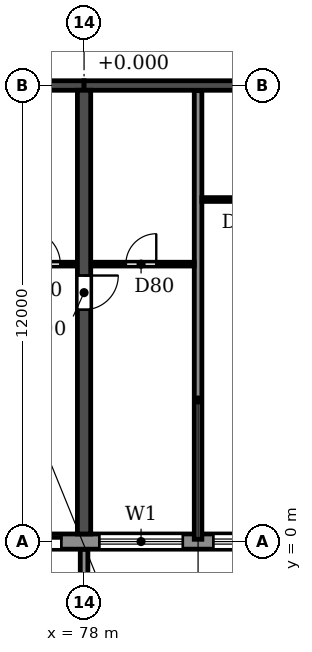
"""IFC4 building model, lengths in metres.
Left out: names, types, materials, properties, quantities, classifications, styles, units other than length and angle.
Written with IfcOpenShell. Run it as: python <this file> out.ifc"""

import sys

from ifc_helpers import new_model, si_unit, direction, frame, frame_2d, origin, place, context, subcontext, project, spatial, polyline, rectangle, outline, extrude, source, transform, mapped, element, fill, save


model = new_model("IFC4")
c1 = context("Model", 3, precision=1e-05, world=origin(), true_north=direction((0.0, 1.0)))
c2 = subcontext(c1, "Body", "Model", "MODEL_VIEW")
j1 = project(units=[si_unit("LENGTHUNIT", "METRE"), si_unit("PLANEANGLEUNIT", "RADIAN")], contexts=[c1])
p1 = place(None, origin())
s1 = spatial("IfcSite", under=j1, at=p1, CompositionType="ELEMENT")
p2 = place(p1, origin())
s2 = spatial("IfcBuilding", under=s1, at=p2, CompositionType="ELEMENT")
p3 = place(p2, frame((0.0, 0.0, 72.9)))
s3 = spatial("IfcBuildingStorey", under=s2, at=p3, CompositionType="ELEMENT", Elevation=72.9)
p4 = place(p3, frame((78.0, 0.2, 0.0), z_axis=(0.0, 0.0, 1.0), x_axis=(0.0, 1.0, 0.0)))
e1 = element("IfcWall", 1, at=p4, inside=s3, PredefinedType="SHEAR", context=c2, shape_type="SweptSolid", body=[
    extrude(rectangle(XDim=11.675, YDim=0.35, at=frame_2d((5.837, 0.0))), origin(), (0.0, 0.0, 1.0), 3.06),
])
p5 = place(p4, frame((5.9, 0.0, 0.0)))
e2 = element("IfcOpeningElement", 2, at=p5, cuts=e1, PredefinedType="OPENING", context=c2, shape_type="SweptSolid", body=[
    extrude(rectangle(XDim=0.9, YDim=2.1, at=frame_2d((0.45, 1.05))), frame((0.0, 0.185, 0.0), z_axis=(0.0, -1.0, 0.0), x_axis=(1.0, 0.0, 0.0)), (0.0, 0.0, 1.0), 0.37),
])
p6 = place(p3, frame((72.0, 12.0, 0.0), z_axis=(0.0, 0.0, 1.0), x_axis=(1.0, 0.0, 0.0)))
e3 = element("IfcWall", 3, at=p6, inside=s3, PredefinedType="SHEAR", context=c2, shape_type="SweptSolid", body=[
    extrude(rectangle(XDim=6.0, YDim=0.25, at=frame_2d((3.0, 0.0))), origin(), (0.0, 0.0, 1.0), 2.46),
])
p7 = place(p6, frame((2.45, 0.0, 0.0)))
e4 = element("IfcOpeningElement", 4, at=p7, cuts=e3, PredefinedType="OPENING", context=c2, shape_type="SweptSolid", body=[
    extrude(rectangle(XDim=1.0, YDim=2.1, at=frame_2d((0.5, 1.05))), frame((0.0, 0.135, 0.0), z_axis=(0.0, -1.0, 0.0), x_axis=(1.0, 0.0, 0.0)), (0.0, 0.0, 1.0), 0.27),
])
p8 = place(p3, frame((78.0, 12.0, 0.0), z_axis=(0.0, 0.0, 1.0), x_axis=(1.0, 0.0, 0.0)))
e5 = element("IfcWall", 5, at=p8, inside=s3, PredefinedType="SHEAR", context=c2, shape_type="SweptSolid", body=[
    extrude(rectangle(XDim=6.0, YDim=0.25, at=frame_2d((3.0, 0.0))), origin(), (0.0, 0.0, 1.0), 2.46),
])
p9 = place(p3, frame((10.683, 0.0, 0.0), z_axis=(0.0, 0.0, 1.0), x_axis=(1.0, 0.0, 0.0)))
e6 = element("IfcWall", 6, at=p9, inside=s3, PredefinedType="STANDARD", context=c2, shape_type="SweptSolid", body=[
    extrude(rectangle(XDim=80.634, YDim=0.4, at=frame_2d((40.317, 0.0))), origin(), (0.0, 0.0, 1.0), 3.06),
])
p10 = place(p9, frame((1.717, 0.0, 0.9)))
e7 = element("IfcOpeningElement", 7, at=p10, cuts=e6, PredefinedType="OPENING", context=c2, shape_type="SweptSolid", body=[
    extrude(rectangle(XDim=2.2, YDim=1.5, at=frame_2d((1.1, 0.75))), frame((0.0, 0.21, 0.0), z_axis=(0.0, -1.0, 0.0), x_axis=(1.0, 0.0, 0.0)), (0.0, 0.0, 1.0), 0.42),
])
p11 = place(p9, frame((4.917, 0.0, 0.0)))
e8 = element("IfcOpeningElement", 8, at=p11, cuts=e6, PredefinedType="OPENING", context=c2, shape_type="SweptSolid", body=[
    extrude(rectangle(XDim=1.8, YDim=2.4, at=frame_2d((0.9, 1.2))), frame((0.0, 0.21, 0.0), z_axis=(0.0, -1.0, 0.0), x_axis=(1.0, 0.0, 0.0)), (0.0, 0.0, 1.0), 0.42),
])
p12 = place(p9, frame((7.717, 0.0, 0.9)))
e9 = element("IfcOpeningElement", 9, at=p12, cuts=e6, PredefinedType="OPENING", context=c2, shape_type="SweptSolid", body=[
    extrude(rectangle(XDim=2.2, YDim=1.5, at=frame_2d((1.1, 0.75))), frame((0.0, 0.21, 0.0), z_axis=(0.0, -1.0, 0.0), x_axis=(1.0, 0.0, 0.0)), (0.0, 0.0, 1.0), 0.42),
])
p13 = place(p9, frame((10.717, 0.0, 0.9)))
e10 = element("IfcOpeningElement", 10, at=p13, cuts=e6, PredefinedType="OPENING", context=c2, shape_type="SweptSolid", body=[
    extrude(rectangle(XDim=2.2, YDim=1.5, at=frame_2d((1.1, 0.75))), frame((0.0, 0.21, 0.0), z_axis=(0.0, -1.0, 0.0), x_axis=(1.0, 0.0, 0.0)), (0.0, 0.0, 1.0), 0.42),
])
p14 = place(p9, frame((13.717, 0.0, 0.9)))
e11 = element("IfcOpeningElement", 11, at=p14, cuts=e6, PredefinedType="OPENING", context=c2, shape_type="SweptSolid", body=[
    extrude(rectangle(XDim=2.2, YDim=1.5, at=frame_2d((1.1, 0.75))), frame((0.0, 0.21, 0.0), z_axis=(0.0, -1.0, 0.0), x_axis=(1.0, 0.0, 0.0)), (0.0, 0.0, 1.0), 0.42),
])
p15 = place(p9, frame((16.917, 0.0, 0.0)))
e12 = element("IfcOpeningElement", 12, at=p15, cuts=e6, PredefinedType="OPENING", context=c2, shape_type="SweptSolid", body=[
    extrude(rectangle(XDim=1.8, YDim=2.4, at=frame_2d((0.9, 1.2))), frame((0.0, 0.21, 0.0), z_axis=(0.0, -1.0, 0.0), x_axis=(1.0, 0.0, 0.0)), (0.0, 0.0, 1.0), 0.42),
])
p16 = place(p9, frame((19.717, 0.0, 0.9)))
e13 = element("IfcOpeningElement", 13, at=p16, cuts=e6, PredefinedType="OPENING", context=c2, shape_type="SweptSolid", body=[
    extrude(rectangle(XDim=2.2, YDim=1.5, at=frame_2d((1.1, 0.75))), frame((0.0, 0.21, 0.0), z_axis=(0.0, -1.0, 0.0), x_axis=(1.0, 0.0, 0.0)), (0.0, 0.0, 1.0), 0.42),
])
p17 = place(p9, frame((22.717, 0.0, 0.9)))
e14 = element("IfcOpeningElement", 14, at=p17, cuts=e6, PredefinedType="OPENING", context=c2, shape_type="SweptSolid", body=[
    extrude(rectangle(XDim=2.2, YDim=1.5, at=frame_2d((1.1, 0.75))), frame((0.0, 0.21, 0.0), z_axis=(0.0, -1.0, 0.0), x_axis=(1.0, 0.0, 0.0)), (0.0, 0.0, 1.0), 0.42),
])
p18 = place(p9, frame((25.917, 0.0, 0.0)))
e15 = element("IfcOpeningElement", 15, at=p18, cuts=e6, PredefinedType="OPENING", context=c2, shape_type="SweptSolid", body=[
    extrude(rectangle(XDim=1.8, YDim=2.4, at=frame_2d((0.9, 1.2))), frame((0.0, 0.21, 0.0), z_axis=(0.0, -1.0, 0.0), x_axis=(1.0, 0.0, 0.0)), (0.0, 0.0, 1.0), 0.42),
])
p19 = place(p9, frame((28.717, 0.0, 0.9)))
e16 = element("IfcOpeningElement", 16, at=p19, cuts=e6, PredefinedType="OPENING", context=c2, shape_type="SweptSolid", body=[
    extrude(rectangle(XDim=2.2, YDim=1.5, at=frame_2d((1.1, 0.75))), frame((0.0, 0.21, 0.0), z_axis=(0.0, -1.0, 0.0), x_axis=(1.0, 0.0, 0.0)), (0.0, 0.0, 1.0), 0.42),
])
p20 = place(p9, frame((31.717, 0.0, 0.9)))
e17 = element("IfcOpeningElement", 17, at=p20, cuts=e6, PredefinedType="OPENING", context=c2, shape_type="SweptSolid", body=[
    extrude(rectangle(XDim=2.2, YDim=1.5, at=frame_2d((1.1, 0.75))), frame((0.0, 0.21, 0.0), z_axis=(0.0, -1.0, 0.0), x_axis=(1.0, 0.0, 0.0)), (0.0, 0.0, 1.0), 0.42),
])
p21 = place(p9, frame((34.717, 0.0, 0.9)))
e18 = element("IfcOpeningElement", 18, at=p21, cuts=e6, PredefinedType="OPENING", context=c2, shape_type="SweptSolid", body=[
    extrude(rectangle(XDim=2.2, YDim=1.5, at=frame_2d((1.1, 0.75))), frame((0.0, 0.21, 0.0), z_axis=(0.0, -1.0, 0.0), x_axis=(1.0, 0.0, 0.0)), (0.0, 0.0, 1.0), 0.42),
])
p22 = place(p9, frame((37.917, 0.0, 0.0)))
e19 = element("IfcOpeningElement", 19, at=p22, cuts=e6, PredefinedType="OPENING", context=c2, shape_type="SweptSolid", body=[
    extrude(rectangle(XDim=1.8, YDim=2.4, at=frame_2d((0.9, 1.2))), frame((0.0, 0.21, 0.0), z_axis=(0.0, -1.0, 0.0), x_axis=(1.0, 0.0, 0.0)), (0.0, 0.0, 1.0), 0.42),
])
p23 = place(p9, frame((40.717, 0.0, 0.9)))
e20 = element("IfcOpeningElement", 20, at=p23, cuts=e6, PredefinedType="OPENING", context=c2, shape_type="SweptSolid", body=[
    extrude(rectangle(XDim=2.2, YDim=1.5, at=frame_2d((1.1, 0.75))), frame((0.0, 0.21, 0.0), z_axis=(0.0, -1.0, 0.0), x_axis=(1.0, 0.0, 0.0)), (0.0, 0.0, 1.0), 0.42),
])
p24 = place(p9, frame((43.717, 0.0, 0.9)))
e21 = element("IfcOpeningElement", 21, at=p24, cuts=e6, PredefinedType="OPENING", context=c2, shape_type="SweptSolid", body=[
    extrude(rectangle(XDim=2.2, YDim=1.5, at=frame_2d((1.1, 0.75))), frame((0.0, 0.21, 0.0), z_axis=(0.0, -1.0, 0.0), x_axis=(1.0, 0.0, 0.0)), (0.0, 0.0, 1.0), 0.42),
])
p25 = place(p9, frame((46.717, 0.0, 0.9)))
e22 = element("IfcOpeningElement", 22, at=p25, cuts=e6, PredefinedType="OPENING", context=c2, shape_type="SweptSolid", body=[
    extrude(rectangle(XDim=2.2, YDim=1.5, at=frame_2d((1.1, 0.75))), frame((0.0, 0.21, 0.0), z_axis=(0.0, -1.0, 0.0), x_axis=(1.0, 0.0, 0.0)), (0.0, 0.0, 1.0), 0.42),
])
p26 = place(p9, frame((49.917, 0.0, 0.0)))
e23 = element("IfcOpeningElement", 23, at=p26, cuts=e6, PredefinedType="OPENING", context=c2, shape_type="SweptSolid", body=[
    extrude(rectangle(XDim=1.8, YDim=2.4, at=frame_2d((0.9, 1.2))), frame((0.0, 0.21, 0.0), z_axis=(0.0, -1.0, 0.0), x_axis=(1.0, 0.0, 0.0)), (0.0, 0.0, 1.0), 0.42),
])
p27 = place(p9, frame((52.717, 0.0, 0.9)))
e24 = element("IfcOpeningElement", 24, at=p27, cuts=e6, PredefinedType="OPENING", context=c2, shape_type="SweptSolid", body=[
    extrude(rectangle(XDim=2.2, YDim=1.5, at=frame_2d((1.1, 0.75))), frame((0.0, 0.21, 0.0), z_axis=(0.0, -1.0, 0.0), x_axis=(1.0, 0.0, 0.0)), (0.0, 0.0, 1.0), 0.42),
])
p28 = place(p9, frame((55.717, 0.0, 0.9)))
e25 = element("IfcOpeningElement", 25, at=p28, cuts=e6, PredefinedType="OPENING", context=c2, shape_type="SweptSolid", body=[
    extrude(rectangle(XDim=2.2, YDim=1.5, at=frame_2d((1.1, 0.75))), frame((0.0, 0.21, 0.0), z_axis=(0.0, -1.0, 0.0), x_axis=(1.0, 0.0, 0.0)), (0.0, 0.0, 1.0), 0.42),
])
p29 = place(p9, frame((58.717, 0.0, 0.9)))
e26 = element("IfcOpeningElement", 26, at=p29, cuts=e6, PredefinedType="OPENING", context=c2, shape_type="SweptSolid", body=[
    extrude(rectangle(XDim=2.2, YDim=1.5, at=frame_2d((1.1, 0.75))), frame((0.0, 0.21, 0.0), z_axis=(0.0, -1.0, 0.0), x_axis=(1.0, 0.0, 0.0)), (0.0, 0.0, 1.0), 0.42),
])
p30 = place(p9, frame((61.717, 0.0, 0.9)))
e27 = element("IfcOpeningElement", 27, at=p30, cuts=e6, PredefinedType="OPENING", context=c2, shape_type="SweptSolid", body=[
    extrude(rectangle(XDim=2.2, YDim=1.5, at=frame_2d((1.1, 0.75))), frame((0.0, 0.21, 0.0), z_axis=(0.0, -1.0, 0.0), x_axis=(1.0, 0.0, 0.0)), (0.0, 0.0, 1.0), 0.42),
])
p31 = place(p9, frame((64.917, 0.0, 0.0)))
e28 = element("IfcOpeningElement", 28, at=p31, cuts=e6, PredefinedType="OPENING", context=c2, shape_type="SweptSolid", body=[
    extrude(rectangle(XDim=1.8, YDim=2.4, at=frame_2d((0.9, 1.2))), frame((0.0, 0.21, 0.0), z_axis=(0.0, -1.0, 0.0), x_axis=(1.0, 0.0, 0.0)), (0.0, 0.0, 1.0), 0.42),
])
p32 = place(p9, frame((67.717, 0.0, 0.9)))
e29 = element("IfcOpeningElement", 29, at=p32, cuts=e6, PredefinedType="OPENING", context=c2, shape_type="SweptSolid", body=[
    extrude(rectangle(XDim=2.2, YDim=1.5, at=frame_2d((1.1, 0.75))), frame((0.0, 0.21, 0.0), z_axis=(0.0, -1.0, 0.0), x_axis=(1.0, 0.0, 0.0)), (0.0, 0.0, 1.0), 0.42),
])
p33 = place(p9, frame((70.717, 0.0, 0.9)))
e30 = element("IfcOpeningElement", 30, at=p33, cuts=e6, PredefinedType="OPENING", context=c2, shape_type="SweptSolid", body=[
    extrude(rectangle(XDim=2.2, YDim=1.5, at=frame_2d((1.1, 0.75))), frame((0.0, 0.21, 0.0), z_axis=(0.0, -1.0, 0.0), x_axis=(1.0, 0.0, 0.0)), (0.0, 0.0, 1.0), 0.42),
])
p34 = place(p9, frame((73.917, 0.0, 0.0)))
e31 = element("IfcOpeningElement", 31, at=p34, cuts=e6, PredefinedType="OPENING", context=c2, shape_type="SweptSolid", body=[
    extrude(rectangle(XDim=1.8, YDim=2.4, at=frame_2d((0.9, 1.2))), frame((0.0, 0.21, 0.0), z_axis=(0.0, -1.0, 0.0), x_axis=(1.0, 0.0, 0.0)), (0.0, 0.0, 1.0), 0.42),
])
p35 = place(p9, frame((76.717, 0.0, 0.9)))
e32 = element("IfcOpeningElement", 32, at=p35, cuts=e6, PredefinedType="OPENING", context=c2, shape_type="SweptSolid", body=[
    extrude(rectangle(XDim=2.2, YDim=1.5, at=frame_2d((1.1, 0.75))), frame((0.0, 0.21, 0.0), z_axis=(0.0, -1.0, 0.0), x_axis=(1.0, 0.0, 0.0)), (0.0, 0.0, 1.0), 0.42),
])
m1 = source(origin(), c2, "Body", "SweptSolid", [
    extrude(outline(polyline([(0.0, 0.0), (0.2, 0.0), (0.2, 1.65), (0.0, 1.65), (0.0, 0.0)])), origin(), (0.0, 0.0, 1.0), 3.1),
])
p36 = place(p3, frame((77.9, -1.85, 0.0)))
e33 = element("IfcWall", 33, at=p36, inside=s3, PredefinedType="STANDARD", context=c2, shape_type="MappedRepresentation", body=[
    mapped(m1, transform((0.0, 0.0, 0.0))),
])
p37 = place(p3, frame((81.0, 0.06, 0.0), z_axis=(0.0, 0.0, 1.0), x_axis=(0.0, 1.0, 0.0)))
e34 = element("IfcWall", 34, at=p37, inside=s3, PredefinedType="PARTITIONING", context=c2, shape_type="SweptSolid", body=[
    extrude(rectangle(XDim=11.805, YDim=0.2, at=frame_2d((5.902, 0.0))), origin(), (0.0, 0.0, 1.0), 3.06),
])
p38 = place(p3, frame((75.8, 7.3, 0.0), z_axis=(0.0, 0.0, 1.0), x_axis=(1.0, 0.0, 0.0)))
e35 = element("IfcWall", 35, at=p38, inside=s3, PredefinedType="PARTITIONING", context=c2, shape_type="SweptSolid", body=[
    extrude(rectangle(XDim=2.015, YDim=0.1, at=frame_2d((1.007, 0.0))), origin(), (0.0, 0.0, 1.0), 3.06),
])
p39 = place(p38, frame((0.675, 0.0, 0.0)))
e36 = element("IfcOpeningElement", 36, at=p39, cuts=e35, PredefinedType="OPENING", context=c2, shape_type="SweptSolid", body=[
    extrude(rectangle(XDim=0.9, YDim=2.1, at=frame_2d((0.45, 1.05))), frame((0.0, 0.06, 0.0), z_axis=(0.0, -1.0, 0.0), x_axis=(1.0, 0.0, 0.0)), (0.0, 0.0, 1.0), 0.12),
])
p40 = place(p3, frame((78.185, 7.3, 0.0), z_axis=(0.0, 0.0, 1.0), x_axis=(1.0, 0.0, 0.0)))
e37 = element("IfcWall", 37, at=p40, inside=s3, PredefinedType="PARTITIONING", context=c2, shape_type="SweptSolid", body=[
    extrude(rectangle(XDim=2.715, YDim=0.1, at=frame_2d((1.357, 0.0))), origin(), (0.0, 0.0, 1.0), 3.06),
])
p41 = place(p40, frame((0.915, 0.0, 0.0)))
e38 = element("IfcOpeningElement", 38, at=p41, cuts=e37, PredefinedType="OPENING", context=c2, shape_type="SweptSolid", body=[
    extrude(rectangle(XDim=0.8, YDim=2.1, at=frame_2d((0.4, 1.05))), frame((0.0, 0.06, 0.0), z_axis=(0.0, -1.0, 0.0), x_axis=(1.0, 0.0, 0.0)), (0.0, 0.0, 1.0), 0.12),
])
p42 = place(p3, frame((81.1, 9.0, 0.0), z_axis=(0.0, 0.0, 1.0), x_axis=(1.0, 0.0, 0.0)))
e39 = element("IfcWall", 39, at=p42, inside=s3, PredefinedType="PARTITIONING", context=c2, shape_type="SweptSolid", body=[
    extrude(rectangle(XDim=2.715, YDim=0.1, at=frame_2d((1.357, 0.0))), origin(), (0.0, 0.0, 1.0), 3.06),
])
p43 = place(p42, frame((1.0, 0.0, 0.0)))
e40 = element("IfcOpeningElement", 40, at=p43, cuts=e39, PredefinedType="OPENING", context=c2, shape_type="SweptSolid", body=[
    extrude(rectangle(XDim=0.8, YDim=2.1, at=frame_2d((0.4, 1.05))), frame((0.0, 0.06, 0.0), z_axis=(0.0, -1.0, 0.0), x_axis=(1.0, 0.0, 0.0)), (0.0, 0.0, 1.0), 0.12),
])
p44 = place(p31, origin())
e41 = element("IfcDoor", 41, at=p44, inside=s3, OperationType="DOUBLE_DOOR_SLIDING", PredefinedType="DOOR", context=c2, shape_type="SweptSolid", body=[
    extrude(rectangle(XDim=1.8, YDim=2.4, at=frame_2d((0.9, 1.2))), frame((0.0, 0.025, 0.0), z_axis=(0.0, -1.0, 0.0), x_axis=(1.0, 0.0, 0.0)), (0.0, 0.0, 1.0), 0.05),
])
fill(e28, e41)
p45 = place(p32, origin())
e42 = element("IfcWindow", 42, at=p45, inside=s3, PartitioningType="DOUBLE_PANEL_HORIZONTAL", PredefinedType="WINDOW", context=c2, shape_type="SweptSolid", body=[
    extrude(rectangle(XDim=2.2, YDim=1.5, at=frame_2d((1.1, 0.75))), frame((0.0, 0.03, 0.0), z_axis=(0.0, -1.0, 0.0), x_axis=(1.0, 0.0, 0.0)), (0.0, 0.0, 1.0), 0.06),
])
fill(e29, e42)
p46 = place(p33, origin())
e43 = element("IfcWindow", 43, at=p46, inside=s3, PartitioningType="DOUBLE_PANEL_HORIZONTAL", PredefinedType="WINDOW", context=c2, shape_type="SweptSolid", body=[
    extrude(rectangle(XDim=2.2, YDim=1.5, at=frame_2d((1.1, 0.75))), frame((0.0, 0.03, 0.0), z_axis=(0.0, -1.0, 0.0), x_axis=(1.0, 0.0, 0.0)), (0.0, 0.0, 1.0), 0.06),
])
fill(e30, e43)
p47 = place(p41, origin())
e44 = element("IfcDoor", 44, at=p47, inside=s3, OperationType="SINGLE_SWING_RIGHT", PredefinedType="DOOR", context=c2, shape_type="SweptSolid", body=[
    extrude(rectangle(XDim=0.8, YDim=2.1, at=frame_2d((0.4, 1.05))), frame((0.0, 0.025, 0.0), z_axis=(0.0, -1.0, 0.0), x_axis=(1.0, 0.0, 0.0)), (0.0, 0.0, 1.0), 0.05),
])
fill(e38, e44)
p48 = place(p39, origin())
e45 = element("IfcDoor", 45, at=p48, inside=s3, OperationType="SINGLE_SWING_LEFT", PredefinedType="DOOR", context=c2, shape_type="SweptSolid", body=[
    extrude(rectangle(XDim=0.9, YDim=2.1, at=frame_2d((0.45, 1.05))), frame((0.0, 0.025, 0.0), z_axis=(0.0, -1.0, 0.0), x_axis=(1.0, 0.0, 0.0)), (0.0, 0.0, 1.0), 0.05),
])
fill(e36, e45)
p49 = place(p5, frame((0.9, 0.0, 0.0), z_axis=(0.0, 0.0, 1.0), x_axis=(-1.0, 0.0, 0.0)))
e46 = element("IfcDoor", 46, at=p49, inside=s3, OperationType="SINGLE_SWING_LEFT", PredefinedType="DOOR", context=c2, shape_type="SweptSolid", body=[
    extrude(rectangle(XDim=0.9, YDim=2.1, at=frame_2d((0.45, 1.05))), frame((0.0, 0.025, 0.0), z_axis=(0.0, -1.0, 0.0), x_axis=(1.0, 0.0, 0.0)), (0.0, 0.0, 1.0), 0.05),
])
fill(e2, e46)
save(model, sys.argv[1])
